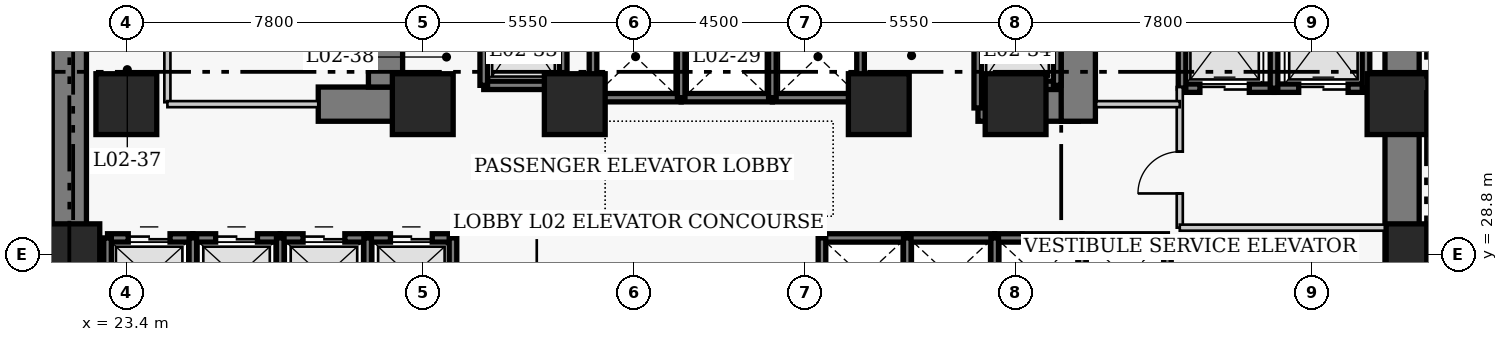
"""IFC4 building model, lengths in metres.
Left out: names, types, materials, properties, quantities, classifications, styles, units other than length and angle.
Written with IfcOpenShell. Run it as: python <this file> out.ifc"""

import sys

from ifc_helpers import new_model, si_unit, direction, frame, frame_2d, origin, origin_2d, place, context, subcontext, project, spatial, rectangle, extrude, element, fill, save


model = new_model("IFC4")
c1 = context("Model", 3, precision=1e-05, world=origin(), true_north=direction((0.0, 1.0)))
c2 = subcontext(c1, "Body", "Model", "MODEL_VIEW")
j1 = project(units=[si_unit("LENGTHUNIT", "METRE"), si_unit("PLANEANGLEUNIT", "RADIAN")], contexts=[c1])
p1 = place(None, origin())
s1 = spatial("IfcSite", under=j1, at=p1, CompositionType="ELEMENT")
p2 = place(p1, origin())
s2 = spatial("IfcBuilding", under=s1, at=p2, CompositionType="ELEMENT")
p3 = place(p2, frame((0.0, 0.0, 10.4)))
s3 = spatial("IfcBuildingStorey", under=s2, at=p3, CompositionType="ELEMENT", Elevation=10.4)
for number, where, z_axis, x_axis in (
    (1, (21.9, 27.05, 0.0), (0.0, 0.0, 1.0), (0.0, 1.0, 0.0)),
    (2, (56.97, 27.05, 0.0), (0.0, 0.0, 1.0), (0.0, 1.0, 0.0)),
):
    element("IfcWall", number, at=place(p3, frame(where, z_axis=z_axis, x_axis=x_axis)), inside=s3, PredefinedType="SHEAR", context=c2, shape_type="SweptSolid", body=[
        extrude(rectangle(XDim=13.72, YDim=0.9, at=frame_2d((6.86, 0.0))), origin(), (0.0, 0.0, 1.0), 5.4),
    ])
p4 = place(p3, frame((28.45, 32.75, 0.0), z_axis=(0.0, 0.0, 1.0), x_axis=(1.0, 0.0, 0.0)))
e3 = element("IfcWall", 3, at=p4, inside=s3, PredefinedType="SHEAR", context=c2, shape_type="SweptSolid", body=[
    extrude(rectangle(XDim=2.4, YDim=0.9, at=frame_2d((1.2, 0.0))), origin(), (0.0, 0.0, 1.0), 5.4),
])
p5 = place(p3, frame((45.81, 32.75, 0.0), z_axis=(0.0, 0.0, 1.0), x_axis=(1.0, 0.0, 0.0)))
e4 = element("IfcWall", 4, at=p5, inside=s3, PredefinedType="SHEAR", context=c2, shape_type="SweptSolid", body=[
    extrude(rectangle(XDim=2.64, YDim=0.9, at=frame_2d((1.32, 0.0))), origin(), (0.0, 0.0, 1.0), 5.4),
])
p6 = place(p3, frame((30.22, 33.2, 0.0), z_axis=(0.0, 0.0, 1.0), x_axis=(0.0, 1.0, 0.0)))
e5 = element("IfcWall", 5, at=p6, inside=s3, PredefinedType="SHEAR", context=c2, shape_type="SweptSolid", body=[
    extrude(rectangle(XDim=7.12, YDim=0.9, at=frame_2d((3.56, 0.0))), origin(), (0.0, 0.0, 1.0), 5.4),
])
p7 = place(p3, frame((48.45, 32.3, 0.0), z_axis=(0.0, 0.0, 1.0), x_axis=(0.0, 1.0, 0.0)))
e6 = element("IfcWall", 6, at=p7, inside=s3, PredefinedType="SHEAR", context=c2, shape_type="SweptSolid", body=[
    extrude(rectangle(XDim=8.02, YDim=0.9, at=frame_2d((4.01, 0.0))), origin(), (0.0, 0.0, 1.0), 5.4),
])
p8 = place(p7, frame((5.9, 0.0, 0.0)))
e7 = element("IfcOpeningElement", 7, at=p8, cuts=e6, PredefinedType="OPENING", context=c2, shape_type="SweptSolid", body=[
    extrude(rectangle(XDim=1.1, YDim=2.15, at=frame_2d((0.55, 1.075))), frame((0.0, 0.46, 0.0), z_axis=(0.0, -1.0, 0.0), x_axis=(1.0, 0.0, 0.0)), (0.0, 0.0, 1.0), 0.92),
])
for number, where, z_axis, x_axis in (
    (8, (21.9, 28.8, 0.0), (0.0, 0.0, 1.0), (1.0, 0.0, 0.0)),
    (9, (57.35, 28.8, 0.0), (0.0, 0.0, 1.0), (1.0, 0.0, 0.0)),
    (10, (23.4, 32.75, 0.0), (0.0, 0.0, 1.0), (1.0, 0.0, 0.0)),
    (11, (31.2, 32.75, 0.0), (0.0, 0.0, 1.0), (1.0, 0.0, 0.0)),
    (12, (35.2, 32.75, 0.0), (0.0, 0.0, 1.0), (1.0, 0.0, 0.0)),
    (13, (43.2, 32.75, 0.0), (0.0, 0.0, 1.0), (1.0, 0.0, 0.0)),
    (14, (46.8, 32.75, 0.0), (0.0, 0.0, 1.0), (1.0, 0.0, 0.0)),
    (15, (56.85, 32.75, 0.0), (0.0, 0.0, 1.0), (1.0, 0.0, 0.0)),
):
    element("IfcColumn", number, at=place(p3, frame(where, z_axis=z_axis, x_axis=x_axis)), inside=s3, PredefinedType="COLUMN", context=c2, shape_type="SweptSolid", body=[
        extrude(rectangle(XDim=1.6, YDim=1.6, at=origin_2d()), origin(), (0.0, 0.0, 1.0), 5.4),
    ])
p9 = place(p3, frame((22.905, 29.23, 0.0), z_axis=(0.0, 0.0, 1.0), x_axis=(1.0, 0.0, 0.0)))
e16 = element("IfcWall", 16, at=p9, inside=s3, PredefinedType="SHEAR", context=c2, shape_type="SweptSolid", body=[
    extrude(rectangle(XDim=2.245, YDim=0.22, at=frame_2d((1.123, 0.0))), origin(), (0.0, 0.0, 1.0), 5.4),
])
p10 = place(p9, frame((0.545, 0.0, 0.0)))
e17 = element("IfcOpeningElement", 17, at=p10, cuts=e16, PredefinedType="OPENING", context=c2, shape_type="SweptSolid", body=[
    extrude(rectangle(XDim=1.1, YDim=2.15, at=frame_2d((0.55, 1.075))), frame((0.0, 0.12, 0.0), z_axis=(0.0, -1.0, 0.0), x_axis=(1.0, 0.0, 0.0)), (0.0, 0.0, 1.0), 0.24),
])
p11 = place(p3, frame((22.905, 27.17, 0.0), z_axis=(0.0, 0.0, 1.0), x_axis=(0.0, 1.0, 0.0)))
e18 = element("IfcWall", 18, at=p11, inside=s3, PredefinedType="SHEAR", context=c2, shape_type="SweptSolid", body=[
    extrude(rectangle(XDim=2.06, YDim=0.2, at=frame_2d((1.03, 0.0))), origin(), (0.0, 0.0, 1.0), 5.4),
])
p12 = place(p3, frame((25.15, 29.23, 0.0), z_axis=(0.0, 0.0, 1.0), x_axis=(1.0, 0.0, 0.0)))
e19 = element("IfcWall", 19, at=p12, inside=s3, PredefinedType="SHEAR", context=c2, shape_type="SweptSolid", body=[
    extrude(rectangle(XDim=2.3, YDim=0.22, at=frame_2d((1.15, 0.0))), origin(), (0.0, 0.0, 1.0), 5.4),
])
p13 = place(p12, frame((0.6, 0.0, 0.0)))
e20 = element("IfcOpeningElement", 20, at=p13, cuts=e19, PredefinedType="OPENING", context=c2, shape_type="SweptSolid", body=[
    extrude(rectangle(XDim=1.1, YDim=2.15, at=frame_2d((0.55, 1.075))), frame((0.0, 0.12, 0.0), z_axis=(0.0, -1.0, 0.0), x_axis=(1.0, 0.0, 0.0)), (0.0, 0.0, 1.0), 0.24),
])
p14 = place(p3, frame((25.15, 27.17, 0.0), z_axis=(0.0, 0.0, 1.0), x_axis=(0.0, 1.0, 0.0)))
e21 = element("IfcWall", 21, at=p14, inside=s3, PredefinedType="SHEAR", context=c2, shape_type="SweptSolid", body=[
    extrude(rectangle(XDim=2.06, YDim=0.2, at=frame_2d((1.03, 0.0))), origin(), (0.0, 0.0, 1.0), 5.4),
])
p15 = place(p3, frame((27.45, 29.23, 0.0), z_axis=(0.0, 0.0, 1.0), x_axis=(1.0, 0.0, 0.0)))
e22 = element("IfcWall", 22, at=p15, inside=s3, PredefinedType="SHEAR", context=c2, shape_type="SweptSolid", body=[
    extrude(rectangle(XDim=2.3, YDim=0.22, at=frame_2d((1.15, 0.0))), origin(), (0.0, 0.0, 1.0), 5.4),
])
p16 = place(p15, frame((0.6, 0.0, 0.0)))
e23 = element("IfcOpeningElement", 23, at=p16, cuts=e22, PredefinedType="OPENING", context=c2, shape_type="SweptSolid", body=[
    extrude(rectangle(XDim=1.1, YDim=2.15, at=frame_2d((0.55, 1.075))), frame((0.0, 0.12, 0.0), z_axis=(0.0, -1.0, 0.0), x_axis=(1.0, 0.0, 0.0)), (0.0, 0.0, 1.0), 0.24),
])
p17 = place(p3, frame((27.45, 27.17, 0.0), z_axis=(0.0, 0.0, 1.0), x_axis=(0.0, 1.0, 0.0)))
e24 = element("IfcWall", 24, at=p17, inside=s3, PredefinedType="SHEAR", context=c2, shape_type="SweptSolid", body=[
    extrude(rectangle(XDim=2.06, YDim=0.2, at=frame_2d((1.03, 0.0))), origin(), (0.0, 0.0, 1.0), 5.4),
])
p18 = place(p3, frame((29.75, 29.23, 0.0), z_axis=(0.0, 0.0, 1.0), x_axis=(1.0, 0.0, 0.0)))
e25 = element("IfcWall", 25, at=p18, inside=s3, PredefinedType="SHEAR", context=c2, shape_type="SweptSolid", body=[
    extrude(rectangle(XDim=2.245, YDim=0.22, at=frame_2d((1.123, 0.0))), origin(), (0.0, 0.0, 1.0), 5.4),
])
p19 = place(p18, frame((0.6, 0.0, 0.0)))
e26 = element("IfcOpeningElement", 26, at=p19, cuts=e25, PredefinedType="OPENING", context=c2, shape_type="SweptSolid", body=[
    extrude(rectangle(XDim=1.1, YDim=2.15, at=frame_2d((0.55, 1.075))), frame((0.0, 0.12, 0.0), z_axis=(0.0, -1.0, 0.0), x_axis=(1.0, 0.0, 0.0)), (0.0, 0.0, 1.0), 0.24),
])
for number, where, z_axis, x_axis in (
    (27, (29.75, 27.17, 0.0), (0.0, 0.0, 1.0), (0.0, 1.0, 0.0)),
    (28, (31.995, 27.17, 0.0), (0.0, 0.0, 1.0), (0.0, 1.0, 0.0)),
):
    element("IfcWall", number, at=place(p3, frame(where, z_axis=z_axis, x_axis=x_axis)), inside=s3, PredefinedType="SHEAR", context=c2, shape_type="SweptSolid", body=[
        extrude(rectangle(XDim=2.06, YDim=0.2, at=frame_2d((1.03, 0.0))), origin(), (0.0, 0.0, 1.0), 5.4),
    ])
p20 = place(p3, frame((41.705, 29.23, 0.0), z_axis=(0.0, 0.0, 1.0), x_axis=(1.0, 0.0, 0.0)))
e29 = element("IfcWall", 29, at=p20, inside=s3, PredefinedType="SHEAR", context=c2, shape_type="SweptSolid", body=[
    extrude(rectangle(XDim=2.245, YDim=0.22, at=frame_2d((1.123, 0.0))), origin(), (0.0, 0.0, 1.0), 5.4),
])
p21 = place(p3, frame((41.705, 27.17, 0.0), z_axis=(0.0, 0.0, 1.0), x_axis=(0.0, 1.0, 0.0)))
e30 = element("IfcWall", 30, at=p21, inside=s3, PredefinedType="SHEAR", context=c2, shape_type="SweptSolid", body=[
    extrude(rectangle(XDim=2.06, YDim=0.2, at=frame_2d((1.03, 0.0))), origin(), (0.0, 0.0, 1.0), 5.4),
])
p22 = place(p3, frame((43.95, 29.23, 0.0), z_axis=(0.0, 0.0, 1.0), x_axis=(1.0, 0.0, 0.0)))
e31 = element("IfcWall", 31, at=p22, inside=s3, PredefinedType="SHEAR", context=c2, shape_type="SweptSolid", body=[
    extrude(rectangle(XDim=2.3, YDim=0.22, at=frame_2d((1.15, 0.0))), origin(), (0.0, 0.0, 1.0), 5.4),
])
p23 = place(p3, frame((43.95, 27.17, 0.0), z_axis=(0.0, 0.0, 1.0), x_axis=(0.0, 1.0, 0.0)))
e32 = element("IfcWall", 32, at=p23, inside=s3, PredefinedType="SHEAR", context=c2, shape_type="SweptSolid", body=[
    extrude(rectangle(XDim=2.06, YDim=0.2, at=frame_2d((1.03, 0.0))), origin(), (0.0, 0.0, 1.0), 5.4),
])
p24 = place(p3, frame((46.25, 29.23, 0.0), z_axis=(0.0, 0.0, 1.0), x_axis=(1.0, 0.0, 0.0)))
e33 = element("IfcWall", 33, at=p24, inside=s3, PredefinedType="SHEAR", context=c2, shape_type="SweptSolid", body=[
    extrude(rectangle(XDim=2.3, YDim=0.22, at=frame_2d((1.15, 0.0))), origin(), (0.0, 0.0, 1.0), 5.4),
])
p25 = place(p3, frame((46.25, 27.17, 0.0), z_axis=(0.0, 0.0, 1.0), x_axis=(0.0, 1.0, 0.0)))
e34 = element("IfcWall", 34, at=p25, inside=s3, PredefinedType="SHEAR", context=c2, shape_type="SweptSolid", body=[
    extrude(rectangle(XDim=2.06, YDim=0.2, at=frame_2d((1.03, 0.0))), origin(), (0.0, 0.0, 1.0), 5.4),
])
p26 = place(p3, frame((48.55, 29.23, 0.0), z_axis=(0.0, 0.0, 1.0), x_axis=(1.0, 0.0, 0.0)))
e35 = element("IfcWall", 35, at=p26, inside=s3, PredefinedType="SHEAR", context=c2, shape_type="SweptSolid", body=[
    extrude(rectangle(XDim=2.245, YDim=0.22, at=frame_2d((1.123, 0.0))), origin(), (0.0, 0.0, 1.0), 5.4),
])
for number, where, z_axis, x_axis in (
    (36, (48.55, 27.17, 0.0), (0.0, 0.0, 1.0), (0.0, 1.0, 0.0)),
    (37, (50.795, 27.17, 0.0), (0.0, 0.0, 1.0), (0.0, 1.0, 0.0)),
):
    element("IfcWall", number, at=place(p3, frame(where, z_axis=z_axis, x_axis=x_axis)), inside=s3, PredefinedType="SHEAR", context=c2, shape_type="SweptSolid", body=[
        extrude(rectangle(XDim=2.06, YDim=0.2, at=frame_2d((1.03, 0.0))), origin(), (0.0, 0.0, 1.0), 5.4),
    ])
p27 = place(p3, frame((35.68, 32.92, 0.0), z_axis=(0.0, 0.0, 1.0), x_axis=(1.0, 0.0, 0.0)))
e38 = element("IfcWall", 38, at=p27, inside=s3, PredefinedType="SHEAR", context=c2, shape_type="SweptSolid", body=[
    extrude(rectangle(XDim=2.32, YDim=0.22, at=frame_2d((1.16, 0.0))), origin(), (0.0, 0.0, 1.0), 5.4),
])
p28 = place(p3, frame((35.68, 32.92, 0.0), z_axis=(0.0, 0.0, 1.0), x_axis=(0.0, 1.0, 0.0)))
e39 = element("IfcWall", 39, at=p28, inside=s3, PredefinedType="SHEAR", context=c2, shape_type="SweptSolid", body=[
    extrude(rectangle(XDim=2.16, YDim=0.2, at=frame_2d((1.08, 0.0))), origin(), (0.0, 0.0, 1.0), 5.4),
])
p29 = place(p3, frame((38.0, 32.92, 0.0), z_axis=(0.0, 0.0, 1.0), x_axis=(1.0, 0.0, 0.0)))
e40 = element("IfcWall", 40, at=p29, inside=s3, PredefinedType="SHEAR", context=c2, shape_type="SweptSolid", body=[
    extrude(rectangle(XDim=2.4, YDim=0.22, at=frame_2d((1.2, 0.0))), origin(), (0.0, 0.0, 1.0), 5.4),
])
p30 = place(p3, frame((38.0, 32.92, 0.0), z_axis=(0.0, 0.0, 1.0), x_axis=(0.0, 1.0, 0.0)))
e41 = element("IfcWall", 41, at=p30, inside=s3, PredefinedType="SHEAR", context=c2, shape_type="SweptSolid", body=[
    extrude(rectangle(XDim=2.16, YDim=0.2, at=frame_2d((1.08, 0.0))), origin(), (0.0, 0.0, 1.0), 5.4),
])
p31 = place(p3, frame((40.4, 32.92, 0.0), z_axis=(0.0, 0.0, 1.0), x_axis=(1.0, 0.0, 0.0)))
e42 = element("IfcWall", 42, at=p31, inside=s3, PredefinedType="SHEAR", context=c2, shape_type="SweptSolid", body=[
    extrude(rectangle(XDim=2.32, YDim=0.22, at=frame_2d((1.16, 0.0))), origin(), (0.0, 0.0, 1.0), 5.4),
])
for number, where, z_axis, x_axis in (
    (43, (40.4, 32.92, 0.0), (0.0, 0.0, 1.0), (0.0, 1.0, 0.0)),
    (44, (42.72, 32.92, 0.0), (0.0, 0.0, 1.0), (0.0, 1.0, 0.0)),
):
    element("IfcWall", number, at=place(p3, frame(where, z_axis=z_axis, x_axis=x_axis)), inside=s3, PredefinedType="SHEAR", context=c2, shape_type="SweptSolid", body=[
        extrude(rectangle(XDim=2.16, YDim=0.2, at=frame_2d((1.08, 0.0))), origin(), (0.0, 0.0, 1.0), 5.4),
    ])
p32 = place(p3, frame((51.18, 33.17, 0.0), z_axis=(0.0, 0.0, 1.0), x_axis=(1.0, 0.0, 0.0)))
e45 = element("IfcWall", 45, at=p32, inside=s3, PredefinedType="SHEAR", context=c2, shape_type="SweptSolid", body=[
    extrude(rectangle(XDim=2.42, YDim=0.22, at=frame_2d((1.21, 0.0))), origin(), (0.0, 0.0, 1.0), 5.4),
])
p33 = place(p32, frame((0.47, 0.0, 0.0)))
e46 = element("IfcOpeningElement", 46, at=p33, cuts=e45, PredefinedType="OPENING", context=c2, shape_type="SweptSolid", body=[
    extrude(rectangle(XDim=1.3, YDim=2.15, at=frame_2d((0.65, 1.075))), frame((0.0, 0.12, 0.0), z_axis=(0.0, -1.0, 0.0), x_axis=(1.0, 0.0, 0.0)), (0.0, 0.0, 1.0), 0.24),
])
p34 = place(p3, frame((51.18, 33.17, 0.0), z_axis=(0.0, 0.0, 1.0), x_axis=(0.0, 1.0, 0.0)))
e47 = element("IfcWall", 47, at=p34, inside=s3, PredefinedType="SHEAR", context=c2, shape_type="SweptSolid", body=[
    extrude(rectangle(XDim=2.86, YDim=0.2, at=frame_2d((1.43, 0.0))), origin(), (0.0, 0.0, 1.0), 5.4),
])
p35 = place(p3, frame((53.6, 33.17, 0.0), z_axis=(0.0, 0.0, 1.0), x_axis=(1.0, 0.0, 0.0)))
e48 = element("IfcWall", 48, at=p35, inside=s3, PredefinedType="SHEAR", context=c2, shape_type="SweptSolid", body=[
    extrude(rectangle(XDim=2.42, YDim=0.22, at=frame_2d((1.21, 0.0))), origin(), (0.0, 0.0, 1.0), 5.4),
])
p36 = place(p35, frame((0.65, 0.0, 0.0)))
e49 = element("IfcOpeningElement", 49, at=p36, cuts=e48, PredefinedType="OPENING", context=c2, shape_type="SweptSolid", body=[
    extrude(rectangle(XDim=1.3, YDim=2.15, at=frame_2d((0.65, 1.075))), frame((0.0, 0.12, 0.0), z_axis=(0.0, -1.0, 0.0), x_axis=(1.0, 0.0, 0.0)), (0.0, 0.0, 1.0), 0.24),
])
for number, where, z_axis, x_axis in (
    (50, (53.6, 33.17, 0.0), (0.0, 0.0, 1.0), (0.0, 1.0, 0.0)),
    (51, (56.02, 33.17, 0.0), (0.0, 0.0, 1.0), (0.0, 1.0, 0.0)),
):
    element("IfcWall", number, at=place(p3, frame(where, z_axis=z_axis, x_axis=x_axis)), inside=s3, PredefinedType="SHEAR", context=c2, shape_type="SweptSolid", body=[
        extrude(rectangle(XDim=2.86, YDim=0.2, at=frame_2d((1.43, 0.0))), origin(), (0.0, 0.0, 1.0), 5.4),
    ])
p37 = place(p3, frame((32.805, 33.245, 0.0), z_axis=(0.0, 0.0, 1.0), x_axis=(1.0, 0.0, 0.0)))
e52 = element("IfcWall", 52, at=p37, inside=s3, PredefinedType="SHEAR", context=c2, shape_type="SweptSolid", body=[
    extrude(rectangle(XDim=2.09, YDim=0.22, at=frame_2d((1.045, 0.0))), origin(), (0.0, 0.0, 1.0), 5.4),
])
for number, where, z_axis, x_axis in (
    (53, (32.805, 33.245, 0.0), (0.0, 0.0, 1.0), (0.0, 1.0, 0.0)),
    (54, (34.895, 33.245, 0.0), (0.0, 0.0, 1.0), (0.0, 1.0, 0.0)),
):
    element("IfcWall", number, at=place(p3, frame(where, z_axis=z_axis, x_axis=x_axis)), inside=s3, PredefinedType="SHEAR", context=c2, shape_type="SweptSolid", body=[
        extrude(rectangle(XDim=2.91, YDim=0.2, at=frame_2d((1.455, 0.0))), origin(), (0.0, 0.0, 1.0), 5.4),
    ])
p38 = place(p3, frame((45.805, 33.245, 0.0), z_axis=(0.0, 0.0, 1.0), x_axis=(1.0, 0.0, 0.0)))
e55 = element("IfcWall", 55, at=p38, inside=s3, PredefinedType="SHEAR", context=c2, shape_type="SweptSolid", body=[
    extrude(rectangle(XDim=2.09, YDim=0.22, at=frame_2d((1.045, 0.0))), origin(), (0.0, 0.0, 1.0), 5.4),
])
p39 = place(p3, frame((45.805, 32.65, 0.0), z_axis=(0.0, 0.0, 1.0), x_axis=(0.0, 1.0, 0.0)))
e56 = element("IfcWall", 56, at=p39, inside=s3, PredefinedType="SHEAR", context=c2, shape_type="SweptSolid", body=[
    extrude(rectangle(XDim=3.505, YDim=0.2, at=frame_2d((1.752, 0.0))), origin(), (0.0, 0.0, 1.0), 5.4),
])
p40 = place(p3, frame((47.895, 33.245, 0.0), z_axis=(0.0, 0.0, 1.0), x_axis=(0.0, 1.0, 0.0)))
e57 = element("IfcWall", 57, at=p40, inside=s3, PredefinedType="SHEAR", context=c2, shape_type="SweptSolid", body=[
    extrude(rectangle(XDim=2.91, YDim=0.2, at=frame_2d((1.455, 0.0))), origin(), (0.0, 0.0, 1.0), 5.4),
])
p41 = place(p3, frame((24.48, 32.8, 0.0), z_axis=(0.0, 0.0, 1.0), x_axis=(0.0, 1.0, 0.0)))
e58 = element("IfcWall", 58, at=p41, inside=s3, PredefinedType="PARTITIONING", context=c2, shape_type="SweptSolid", body=[
    extrude(rectangle(XDim=3.57, YDim=0.16, at=frame_2d((1.785, 0.0))), origin(), (0.0, 0.0, 1.0), 5.1),
])
p42 = place(p41, frame((1.604, 0.0, 0.0)))
e59 = element("IfcOpeningElement", 59, at=p42, cuts=e58, PredefinedType="OPENING", context=c2, shape_type="SweptSolid", body=[
    extrude(rectangle(XDim=0.9, YDim=2.1, at=frame_2d((0.45, 1.05))), frame((0.0, 0.09, 0.0), z_axis=(0.0, -1.0, 0.0), x_axis=(1.0, 0.0, 0.0)), (0.0, 0.0, 1.0), 0.18),
])
p43 = place(p3, frame((51.12, 29.5, 0.0), z_axis=(0.0, 0.0, 1.0), x_axis=(0.0, 1.0, 0.0)))
e60 = element("IfcWall", 60, at=p43, inside=s3, PredefinedType="PARTITIONING", context=c2, shape_type="SweptSolid", body=[
    extrude(rectangle(XDim=3.7, YDim=0.16, at=frame_2d((1.85, 0.0))), origin(), (0.0, 0.0, 1.0), 5.1),
])
p44 = place(p43, frame((0.9, 0.0, 0.0)))
e61 = element("IfcOpeningElement", 61, at=p44, cuts=e60, PredefinedType="OPENING", context=c2, shape_type="SweptSolid", body=[
    extrude(rectangle(XDim=1.1, YDim=2.15, at=frame_2d((0.55, 1.075))), frame((0.0, 0.09, 0.0), z_axis=(0.0, -1.0, 0.0), x_axis=(1.0, 0.0, 0.0)), (0.0, 0.0, 1.0), 0.18),
])
p45 = place(p3, frame((51.12, 29.5, 0.0), z_axis=(0.0, 0.0, 1.0), x_axis=(1.0, 0.0, 0.0)))
e62 = element("IfcWall", 62, at=p45, inside=s3, PredefinedType="PARTITIONING", context=c2, shape_type="SweptSolid", body=[
    extrude(rectangle(XDim=5.63, YDim=0.16, at=frame_2d((2.815, 0.0))), origin(), (0.0, 0.0, 1.0), 5.1),
])
p46 = place(p3, frame((24.48, 32.75, 0.0), z_axis=(0.0, 0.0, 1.0), x_axis=(1.0, 0.0, 0.0)))
e63 = element("IfcWall", 63, at=p46, inside=s3, PredefinedType="PARTITIONING", context=c2, shape_type="SweptSolid", body=[
    extrude(rectangle(XDim=3.97, YDim=0.16, at=frame_2d((1.985, 0.0))), origin(), (0.0, 0.0, 1.0), 5.1),
])
p47 = place(p3, frame((48.92, 32.75, 0.0), z_axis=(0.0, 0.0, 1.0), x_axis=(1.0, 0.0, 0.0)))
e64 = element("IfcWall", 64, at=p47, inside=s3, PredefinedType="PARTITIONING", context=c2, shape_type="SweptSolid", body=[
    extrude(rectangle(XDim=2.2, YDim=0.16, at=frame_2d((1.1, 0.0))), origin(), (0.0, 0.0, 1.0), 5.1),
])
p48 = place(p10, origin())
e65 = element("IfcDoor", 65, at=p48, inside=s3, OperationType="DOUBLE_DOOR_SLIDING", PredefinedType="DOOR", context=c2, shape_type="SweptSolid", body=[
    extrude(rectangle(XDim=1.1, YDim=2.15, at=frame_2d((0.55, 1.075))), frame((0.0, 0.025, 0.0), z_axis=(0.0, -1.0, 0.0), x_axis=(1.0, 0.0, 0.0)), (0.0, 0.0, 1.0), 0.05),
])
fill(e17, e65)
p49 = place(p13, origin())
e66 = element("IfcDoor", 66, at=p49, inside=s3, OperationType="DOUBLE_DOOR_SLIDING", PredefinedType="DOOR", context=c2, shape_type="SweptSolid", body=[
    extrude(rectangle(XDim=1.1, YDim=2.15, at=frame_2d((0.55, 1.075))), frame((0.0, 0.025, 0.0), z_axis=(0.0, -1.0, 0.0), x_axis=(1.0, 0.0, 0.0)), (0.0, 0.0, 1.0), 0.05),
])
fill(e20, e66)
p50 = place(p16, origin())
e67 = element("IfcDoor", 67, at=p50, inside=s3, OperationType="DOUBLE_DOOR_SLIDING", PredefinedType="DOOR", context=c2, shape_type="SweptSolid", body=[
    extrude(rectangle(XDim=1.1, YDim=2.15, at=frame_2d((0.55, 1.075))), frame((0.0, 0.025, 0.0), z_axis=(0.0, -1.0, 0.0), x_axis=(1.0, 0.0, 0.0)), (0.0, 0.0, 1.0), 0.05),
])
fill(e23, e67)
p51 = place(p19, origin())
e68 = element("IfcDoor", 68, at=p51, inside=s3, OperationType="DOUBLE_DOOR_SLIDING", PredefinedType="DOOR", context=c2, shape_type="SweptSolid", body=[
    extrude(rectangle(XDim=1.1, YDim=2.15, at=frame_2d((0.55, 1.075))), frame((0.0, 0.025, 0.0), z_axis=(0.0, -1.0, 0.0), x_axis=(1.0, 0.0, 0.0)), (0.0, 0.0, 1.0), 0.05),
])
fill(e26, e68)
p52 = place(p33, origin())
e69 = element("IfcDoor", 69, at=p52, inside=s3, OperationType="DOUBLE_DOOR_SLIDING", PredefinedType="DOOR", context=c2, shape_type="SweptSolid", body=[
    extrude(rectangle(XDim=1.3, YDim=2.15, at=frame_2d((0.65, 1.075))), frame((0.0, 0.025, 0.0), z_axis=(0.0, -1.0, 0.0), x_axis=(1.0, 0.0, 0.0)), (0.0, 0.0, 1.0), 0.05),
])
fill(e46, e69)
p53 = place(p36, origin())
e70 = element("IfcDoor", 70, at=p53, inside=s3, OperationType="DOUBLE_DOOR_SLIDING", PredefinedType="DOOR", context=c2, shape_type="SweptSolid", body=[
    extrude(rectangle(XDim=1.3, YDim=2.15, at=frame_2d((0.65, 1.075))), frame((0.0, 0.025, 0.0), z_axis=(0.0, -1.0, 0.0), x_axis=(1.0, 0.0, 0.0)), (0.0, 0.0, 1.0), 0.05),
])
fill(e49, e70)
p54 = place(p44, origin())
e71 = element("IfcDoor", 71, at=p54, inside=s3, OperationType="SINGLE_SWING_LEFT", PredefinedType="DOOR", context=c2, shape_type="SweptSolid", body=[
    extrude(rectangle(XDim=1.1, YDim=2.15, at=frame_2d((0.55, 1.075))), frame((0.0, 0.025, 0.0), z_axis=(0.0, -1.0, 0.0), x_axis=(1.0, 0.0, 0.0)), (0.0, 0.0, 1.0), 0.05),
])
fill(e61, e71)
save(model, sys.argv[1])
